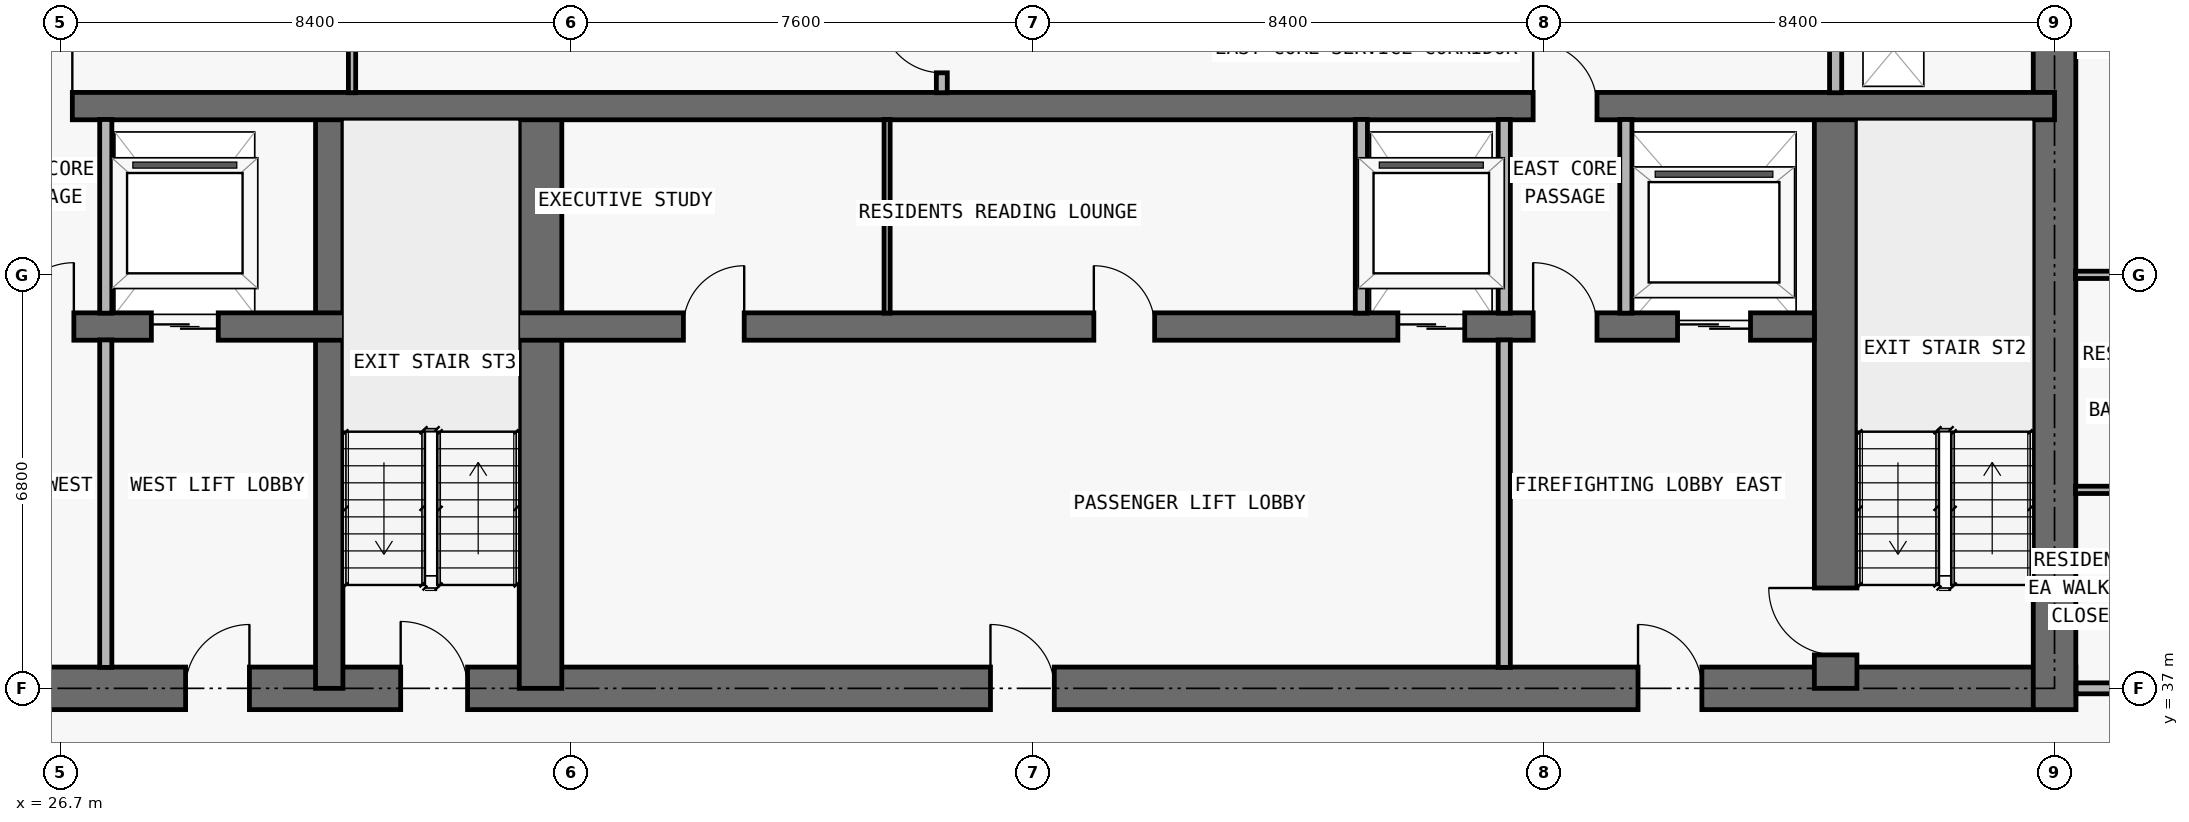
"""IFC4 building model, lengths in metres.
Left out: names, types, materials, properties, quantities, classifications, styles, units other than length and angle.
Written with IfcOpenShell. Run it as: python <this file> out.ifc"""

import sys

from ifc_helpers import new_model, si_unit, direction, frame, frame_2d, origin, place, context, subcontext, project, spatial, rectangle, extrude, element, fill, save


model = new_model("IFC4")
c1 = context("Model", 3, precision=1e-05, world=origin(), true_north=direction((0.0, 1.0)))
c2 = subcontext(c1, "Body", "Model", "MODEL_VIEW")
j1 = project(units=[si_unit("LENGTHUNIT", "METRE"), si_unit("PLANEANGLEUNIT", "RADIAN")], contexts=[c1])
p1 = place(None, origin())
s1 = spatial("IfcSite", under=j1, at=p1, CompositionType="ELEMENT")
p2 = place(p1, origin())
s2 = spatial("IfcBuilding", under=s1, at=p2, CompositionType="ELEMENT")
p3 = place(p2, frame((0.0, 0.0, 266.1)))
s3 = spatial("IfcBuildingStorey", under=s2, at=p3, CompositionType="ELEMENT", Elevation=266.1)
p4 = place(p3, frame((17.95, 37.0, 0.0), z_axis=(0.0, 0.0, 1.0), x_axis=(1.0, 0.0, 0.0)))
e1 = element("IfcWall", 1, at=p4, inside=s3, PredefinedType="SHEAR", context=c2, shape_type="SweptSolid", body=[
    extrude(rectangle(XDim=41.9, YDim=0.7, at=frame_2d((20.95, 0.0))), origin(), (0.0, 0.0, 1.0), 3.0),
])
p5 = place(p4, frame((14.35, 0.0, 0.0)))
e2 = element("IfcOpeningElement", 2, at=p5, cuts=e1, PredefinedType="OPENING", context=c2, shape_type="SweptSolid", body=[
    extrude(rectangle(XDim=1.1, YDim=2.15, at=frame_2d((0.55, 1.075))), frame((0.0, 0.36, 0.0), z_axis=(0.0, -1.0, 0.0), x_axis=(1.0, 0.0, 0.0)), (0.0, 0.0, 1.0), 0.72),
])
p6 = place(p4, frame((6.2, 0.0, 0.0)))
e3 = element("IfcOpeningElement", 3, at=p6, cuts=e1, PredefinedType="OPENING", context=c2, shape_type="SweptSolid", body=[
    extrude(rectangle(XDim=1.05, YDim=2.15, at=frame_2d((0.525, 1.075))), frame((0.0, 0.36, 0.0), z_axis=(0.0, -1.0, 0.0), x_axis=(1.0, 0.0, 0.0)), (0.0, 0.0, 1.0), 0.72),
])
p7 = place(p4, frame((34.7, 0.0, 0.0)))
e4 = element("IfcOpeningElement", 4, at=p7, cuts=e1, PredefinedType="OPENING", context=c2, shape_type="SweptSolid", body=[
    extrude(rectangle(XDim=1.05, YDim=2.15, at=frame_2d((0.525, 1.075))), frame((0.0, 0.36, 0.0), z_axis=(0.0, -1.0, 0.0), x_axis=(1.0, 0.0, 0.0)), (0.0, 0.0, 1.0), 0.72),
])
p8 = place(p4, frame((10.812, 0.0, 0.0)))
e5 = element("IfcOpeningElement", 5, at=p8, cuts=e1, PredefinedType="OPENING", context=c2, shape_type="SweptSolid", body=[
    extrude(rectangle(XDim=1.05, YDim=2.15, at=frame_2d((0.525, 1.075))), frame((0.0, 0.36, 0.0), z_axis=(0.0, -1.0, 0.0), x_axis=(1.0, 0.0, 0.0)), (0.0, 0.0, 1.0), 0.72),
])
p9 = place(p4, frame((24.05, 0.0, 0.0)))
e6 = element("IfcOpeningElement", 6, at=p9, cuts=e1, PredefinedType="OPENING", context=c2, shape_type="SweptSolid", body=[
    extrude(rectangle(XDim=1.05, YDim=2.15, at=frame_2d((0.525, 1.075))), frame((0.0, 0.36, 0.0), z_axis=(0.0, -1.0, 0.0), x_axis=(1.0, 0.0, 0.0)), (0.0, 0.0, 1.0), 0.72),
])
p10 = place(p3, frame((59.5, 36.65, 0.0), z_axis=(0.0, 0.0, 1.0), x_axis=(0.0, 1.0, 0.0)))
e7 = element("IfcWall", 7, at=p10, inside=s3, PredefinedType="SHEAR", context=c2, shape_type="SweptSolid", body=[
    extrude(rectangle(XDim=13.95, YDim=0.7, at=frame_2d((6.975, 0.0))), origin(), (0.0, 0.0, 1.0), 3.0),
])
p11 = place(p3, frame((55.9, 37.0, 0.0), z_axis=(0.0, 0.0, 1.0), x_axis=(0.0, 1.0, 0.0)))
e8 = element("IfcWall", 8, at=p11, inside=s3, PredefinedType="SHEAR", context=c2, shape_type="SweptSolid", body=[
    extrude(rectangle(XDim=9.575, YDim=0.7, at=frame_2d((4.788, 0.0))), origin(), (0.0, 0.0, 1.0), 3.0),
])
p12 = place(p11, frame((0.55, 0.0, 0.0)))
e9 = element("IfcOpeningElement", 9, at=p12, cuts=e8, PredefinedType="OPENING", context=c2, shape_type="SweptSolid", body=[
    extrude(rectangle(XDim=1.1, YDim=2.15, at=frame_2d((0.55, 1.075))), frame((0.0, 0.36, 0.0), z_axis=(0.0, -1.0, 0.0), x_axis=(1.0, 0.0, 0.0)), (0.0, 0.0, 1.0), 0.72),
])
p13 = place(p3, frame((31.125, 37.0, 0.0), z_axis=(0.0, 0.0, 1.0), x_axis=(0.0, 1.0, 0.0)))
e10 = element("IfcWall", 10, at=p13, inside=s3, PredefinedType="SHEAR", context=c2, shape_type="SweptSolid", body=[
    extrude(rectangle(XDim=9.575, YDim=0.45, at=frame_2d((4.788, 0.0))), origin(), (0.0, 0.0, 1.0), 3.0),
])
p14 = place(p3, frame((34.6, 37.0, 0.0), z_axis=(0.0, 0.0, 1.0), x_axis=(0.0, 1.0, 0.0)))
e11 = element("IfcWall", 11, at=p14, inside=s3, PredefinedType="SHEAR", context=c2, shape_type="SweptSolid", body=[
    extrude(rectangle(XDim=9.575, YDim=0.7, at=frame_2d((4.788, 0.0))), origin(), (0.0, 0.0, 1.0), 3.0),
])
p15 = place(p3, frame((22.25, 42.95, 0.0), z_axis=(0.0, 0.0, 1.0), x_axis=(1.0, 0.0, 0.0)))
e12 = element("IfcWall", 12, at=p15, inside=s3, PredefinedType="SHEAR", context=c2, shape_type="SweptSolid", body=[
    extrude(rectangle(XDim=33.3, YDim=0.45, at=frame_2d((16.65, 0.0))), origin(), (0.0, 0.0, 1.0), 3.0),
])
p16 = place(p15, frame((1.05, 0.0, 0.0)))
e13 = element("IfcOpeningElement", 13, at=p16, cuts=e12, PredefinedType="OPENING", context=c2, shape_type="SweptSolid", body=[
    extrude(rectangle(XDim=1.2, YDim=2.2, at=frame_2d((0.6, 1.1))), frame((0.0, 0.235, 0.0), z_axis=(0.0, -1.0, 0.0), x_axis=(1.0, 0.0, 0.0)), (0.0, 0.0, 1.0), 0.47),
])
p17 = place(p15, frame((31.05, 0.0, 0.0)))
e14 = element("IfcOpeningElement", 14, at=p17, cuts=e12, PredefinedType="OPENING", context=c2, shape_type="SweptSolid", body=[
    extrude(rectangle(XDim=1.2, YDim=2.2, at=frame_2d((0.6, 1.1))), frame((0.0, 0.235, 0.0), z_axis=(0.0, -1.0, 0.0), x_axis=(1.0, 0.0, 0.0)), (0.0, 0.0, 1.0), 0.47),
])
p18 = place(p15, frame((26.45, 0.0, 0.0)))
e15 = element("IfcOpeningElement", 15, at=p18, cuts=e12, PredefinedType="OPENING", context=c2, shape_type="SweptSolid", body=[
    extrude(rectangle(XDim=1.1, YDim=2.2, at=frame_2d((0.55, 1.1))), frame((0.0, 0.235, 0.0), z_axis=(0.0, -1.0, 0.0), x_axis=(1.0, 0.0, 0.0)), (0.0, 0.0, 1.0), 0.47),
])
p19 = place(p15, frame((5.95, 0.0, 0.0)))
e16 = element("IfcOpeningElement", 16, at=p19, cuts=e12, PredefinedType="OPENING", context=c2, shape_type="SweptSolid", body=[
    extrude(rectangle(XDim=1.1, YDim=2.2, at=frame_2d((0.55, 1.1))), frame((0.0, 0.235, 0.0), z_axis=(0.0, -1.0, 0.0), x_axis=(1.0, 0.0, 0.0)), (0.0, 0.0, 1.0), 0.47),
])
p20 = place(p15, frame((3.625, 0.0, 0.0)))
e17 = element("IfcOpeningElement", 17, at=p20, cuts=e12, PredefinedType="OPENING", context=c2, shape_type="SweptSolid", body=[
    extrude(rectangle(XDim=1.05, YDim=2.15, at=frame_2d((0.525, 1.075))), frame((0.0, 0.235, 0.0), z_axis=(0.0, -1.0, 0.0), x_axis=(1.0, 0.0, 0.0)), (0.0, 0.0, 1.0), 0.47),
])
p21 = place(p15, frame((28.675, 0.0, 0.0)))
e18 = element("IfcOpeningElement", 18, at=p21, cuts=e12, PredefinedType="OPENING", context=c2, shape_type="SweptSolid", body=[
    extrude(rectangle(XDim=1.05, YDim=2.15, at=frame_2d((0.525, 1.075))), frame((0.0, 0.235, 0.0), z_axis=(0.0, -1.0, 0.0), x_axis=(1.0, 0.0, 0.0)), (0.0, 0.0, 1.0), 0.47),
])
p22 = place(p15, frame((14.7, 0.0, 0.0)))
e19 = element("IfcOpeningElement", 19, at=p22, cuts=e12, PredefinedType="OPENING", context=c2, shape_type="SweptSolid", body=[
    extrude(rectangle(XDim=1.0, YDim=2.2, at=frame_2d((0.5, 1.1))), frame((0.0, 0.235, 0.0), z_axis=(0.0, -1.0, 0.0), x_axis=(1.0, 0.0, 0.0)), (0.0, 0.0, 1.0), 0.47),
])
p23 = place(p15, frame((21.45, 0.0, 0.0)))
e20 = element("IfcOpeningElement", 20, at=p23, cuts=e12, PredefinedType="OPENING", context=c2, shape_type="SweptSolid", body=[
    extrude(rectangle(XDim=1.0, YDim=2.2, at=frame_2d((0.5, 1.1))), frame((0.0, 0.235, 0.0), z_axis=(0.0, -1.0, 0.0), x_axis=(1.0, 0.0, 0.0)), (0.0, 0.0, 1.0), 0.47),
])
p24 = place(p3, frame((18.3, 46.575, 0.0), z_axis=(0.0, 0.0, 1.0), x_axis=(1.0, 0.0, 0.0)))
e21 = element("IfcWall", 21, at=p24, inside=s3, PredefinedType="SHEAR", context=c2, shape_type="SweptSolid", body=[
    extrude(rectangle(XDim=41.2, YDim=0.45, at=frame_2d((20.6, 0.0))), origin(), (0.0, 0.0, 1.0), 3.0),
])
p25 = place(p24, frame((7.6, 0.0, 0.0)))
e22 = element("IfcOpeningElement", 22, at=p25, cuts=e21, PredefinedType="OPENING", context=c2, shape_type="SweptSolid", body=[
    extrude(rectangle(XDim=1.0, YDim=2.2, at=frame_2d((0.5, 1.1))), frame((0.0, 0.235, 0.0), z_axis=(0.0, -1.0, 0.0), x_axis=(1.0, 0.0, 0.0)), (0.0, 0.0, 1.0), 0.47),
])
p26 = place(p24, frame((32.625, 0.0, 0.0)))
e23 = element("IfcOpeningElement", 23, at=p26, cuts=e21, PredefinedType="OPENING", context=c2, shape_type="SweptSolid", body=[
    extrude(rectangle(XDim=1.05, YDim=2.15, at=frame_2d((0.525, 1.075))), frame((0.0, 0.235, 0.0), z_axis=(0.0, -1.0, 0.0), x_axis=(1.0, 0.0, 0.0)), (0.0, 0.0, 1.0), 0.47),
])
p27 = place(p3, frame((27.45, 37.345, 0.0), z_axis=(0.0, 0.0, 1.0), x_axis=(0.0, 1.0, 0.0)))
e24 = element("IfcWall", 24, at=p27, inside=s3, PredefinedType="PARTITIONING", context=c2, shape_type="SweptSolid", body=[
    extrude(rectangle(XDim=5.385, YDim=0.2, at=frame_2d((2.692, 0.0))), origin(), (0.0, 0.0, 1.0), 3.0),
])
p28 = place(p3, frame((27.45, 43.17, 0.0), z_axis=(0.0, 0.0, 1.0), x_axis=(0.0, 1.0, 0.0)))
e25 = element("IfcWall", 25, at=p28, inside=s3, PredefinedType="PARTITIONING", context=c2, shape_type="SweptSolid", body=[
    extrude(rectangle(XDim=3.185, YDim=0.2, at=frame_2d((1.593, 0.0))), origin(), (0.0, 0.0, 1.0), 3.0),
])
p29 = place(p3, frame((31.5, 46.795, 0.0), z_axis=(0.0, 0.0, 1.0), x_axis=(0.0, 1.0, 0.0)))
e26 = element("IfcWall", 26, at=p29, inside=s3, PredefinedType="PARTITIONING", context=c2, shape_type="SweptSolid", body=[
    extrude(rectangle(XDim=3.16, YDim=0.12, at=frame_2d((1.58, 0.0))), origin(), (0.0, 0.0, 1.0), 3.0),
])
p30 = place(p3, frame((40.3, 43.17, 0.0), z_axis=(0.0, 0.0, 1.0), x_axis=(0.0, 1.0, 0.0)))
e27 = element("IfcWall", 27, at=p30, inside=s3, PredefinedType="MOVABLE", context=c2, shape_type="SweptSolid", body=[
    extrude(rectangle(XDim=3.185, YDim=0.1, at=frame_2d((1.593, 0.0))), origin(), (0.0, 0.0, 1.0), 3.0),
])
p31 = place(p3, frame((41.2, 46.795, 0.0), z_axis=(0.0, 0.0, 1.0), x_axis=(0.0, 1.0, 0.0)))
e28 = element("IfcWall", 28, at=p31, inside=s3, PredefinedType="PARTITIONING", context=c2, shape_type="SweptSolid", body=[
    extrude(rectangle(XDim=3.16, YDim=0.18, at=frame_2d((1.58, 0.0))), origin(), (0.0, 0.0, 1.0), 3.0),
])
p32 = place(p31, frame((0.327, 0.0, 0.0)))
e29 = element("IfcOpeningElement", 29, at=p32, cuts=e28, PredefinedType="OPENING", context=c2, shape_type="SweptSolid", body=[
    extrude(rectangle(XDim=1.0, YDim=2.2, at=frame_2d((0.5, 1.1))), frame((0.0, 0.1, 0.0), z_axis=(0.0, -1.0, 0.0), x_axis=(1.0, 0.0, 0.0)), (0.0, 0.0, 1.0), 0.2),
])
p33 = place(p3, frame((48.1, 43.17, 0.0), z_axis=(0.0, 0.0, 1.0), x_axis=(0.0, 1.0, 0.0)))
e30 = element("IfcWall", 30, at=p33, inside=s3, PredefinedType="PARTITIONING", context=c2, shape_type="SweptSolid", body=[
    extrude(rectangle(XDim=3.185, YDim=0.2, at=frame_2d((1.593, 0.0))), origin(), (0.0, 0.0, 1.0), 3.0),
])
p34 = place(p3, frame((50.45, 37.345, 0.0), z_axis=(0.0, 0.0, 1.0), x_axis=(0.0, 1.0, 0.0)))
e31 = element("IfcWall", 31, at=p34, inside=s3, PredefinedType="PARTITIONING", context=c2, shape_type="SweptSolid", body=[
    extrude(rectangle(XDim=5.385, YDim=0.2, at=frame_2d((2.692, 0.0))), origin(), (0.0, 0.0, 1.0), 3.0),
])
for number, where, z_axis, x_axis in (
    (32, (50.45, 43.17, 0.0), (0.0, 0.0, 1.0), (0.0, 1.0, 0.0)),
    (33, (52.45, 43.17, 0.0), (0.0, 0.0, 1.0), (0.0, 1.0, 0.0)),
):
    element("IfcWall", number, at=place(p3, frame(where, z_axis=z_axis, x_axis=x_axis)), inside=s3, PredefinedType="PARTITIONING", context=c2, shape_type="SweptSolid", body=[
        extrude(rectangle(XDim=3.185, YDim=0.2, at=frame_2d((1.593, 0.0))), origin(), (0.0, 0.0, 1.0), 3.0),
    ])
p35 = place(p3, frame((55.9, 46.795, 0.0), z_axis=(0.0, 0.0, 1.0), x_axis=(0.0, 1.0, 0.0)))
e34 = element("IfcWall", 34, at=p35, inside=s3, PredefinedType="PARTITIONING", context=c2, shape_type="SweptSolid", body=[
    extrude(rectangle(XDim=3.16, YDim=0.2, at=frame_2d((1.58, 0.0))), origin(), (0.0, 0.0, 1.0), 3.0),
])
p36 = place(p3, frame((59.855, 37.0, 0.0), z_axis=(0.0, 0.0, 1.0), x_axis=(1.0, 0.0, 0.0)))
e35 = element("IfcWall", 35, at=p36, inside=s3, PredefinedType="PARTITIONING", context=c2, shape_type="SweptSolid", body=[
    extrude(rectangle(XDim=5.845, YDim=0.18, at=frame_2d((2.922, 0.0))), origin(), (0.0, 0.0, 1.0), 3.0),
])
p37 = place(p36, frame((3.57, 0.0, 0.0)))
e36 = element("IfcOpeningElement", 36, at=p37, cuts=e35, PredefinedType="OPENING", context=c2, shape_type="SweptSolid", body=[
    extrude(rectangle(XDim=1.0, YDim=2.2, at=frame_2d((0.5, 1.1))), frame((0.0, 0.1, 0.0), z_axis=(0.0, -1.0, 0.0), x_axis=(1.0, 0.0, 0.0)), (0.0, 0.0, 1.0), 0.2),
])
p38 = place(p3, frame((59.845, 40.264, 0.0), z_axis=(0.0, 0.0, 1.0), x_axis=(1.0, 0.0, 0.0)))
e37 = element("IfcWall", 37, at=p38, inside=s3, PredefinedType="PARTITIONING", context=c2, shape_type="SweptSolid", body=[
    extrude(rectangle(XDim=2.305, YDim=0.12, at=frame_2d((1.152, 0.0))), origin(), (0.0, 0.0, 1.0), 3.0),
])
p39 = place(p3, frame((59.845, 43.8, 0.0), z_axis=(0.0, 0.0, 1.0), x_axis=(1.0, 0.0, 0.0)))
e38 = element("IfcWall", 38, at=p39, inside=s3, PredefinedType="PARTITIONING", context=c2, shape_type="SweptSolid", body=[
    extrude(rectangle(XDim=9.56, YDim=0.12, at=frame_2d((4.78, 0.0))), origin(), (0.0, 0.0, 1.0), 2.368),
])
p40 = place(p39, frame((3.63, 0.0, 0.0)))
e39 = element("IfcOpeningElement", 39, at=p40, cuts=e38, PredefinedType="OPENING", context=c2, shape_type="SweptSolid", body=[
    extrude(rectangle(XDim=0.9, YDim=2.15, at=frame_2d((0.45, 1.075))), frame((0.0, 0.07, 0.0), z_axis=(0.0, -1.0, 0.0), x_axis=(1.0, 0.0, 0.0)), (0.0, 0.0, 1.0), 0.14),
])
p41 = place(p39, frame((0.728, 0.0, 0.0)))
e40 = element("IfcOpeningElement", 40, at=p41, cuts=e38, PredefinedType="OPENING", context=c2, shape_type="SweptSolid", body=[
    extrude(rectangle(XDim=0.85, YDim=2.1, at=frame_2d((0.425, 1.05))), frame((0.0, 0.07, 0.0), z_axis=(0.0, -1.0, 0.0), x_axis=(1.0, 0.0, 0.0)), (0.0, 0.0, 1.0), 0.14),
])
p42 = place(p17, origin())
e41 = element("IfcDoor", 41, at=p42, inside=s3, OperationType="DOUBLE_DOOR_SLIDING", PredefinedType="DOOR", context=c2, shape_type="SweptSolid", body=[
    extrude(rectangle(XDim=1.2, YDim=2.2, at=frame_2d((0.6, 1.1))), frame((0.0, 0.025, 0.0), z_axis=(0.0, -1.0, 0.0), x_axis=(1.0, 0.0, 0.0)), (0.0, 0.0, 1.0), 0.05),
])
fill(e14, e41)
p43 = place(p18, origin())
e42 = element("IfcDoor", 42, at=p43, inside=s3, OperationType="DOUBLE_DOOR_SLIDING", PredefinedType="DOOR", context=c2, shape_type="SweptSolid", body=[
    extrude(rectangle(XDim=1.1, YDim=2.2, at=frame_2d((0.55, 1.1))), frame((0.0, 0.025, 0.0), z_axis=(0.0, -1.0, 0.0), x_axis=(1.0, 0.0, 0.0)), (0.0, 0.0, 1.0), 0.05),
])
fill(e15, e42)
p44 = place(p19, origin())
e43 = element("IfcDoor", 43, at=p44, inside=s3, OperationType="DOUBLE_DOOR_SLIDING", PredefinedType="DOOR", context=c2, shape_type="SweptSolid", body=[
    extrude(rectangle(XDim=1.1, YDim=2.2, at=frame_2d((0.55, 1.1))), frame((0.0, 0.025, 0.0), z_axis=(0.0, -1.0, 0.0), x_axis=(1.0, 0.0, 0.0)), (0.0, 0.0, 1.0), 0.05),
])
fill(e16, e43)
p45 = place(p5, origin())
e44 = element("IfcDoor", 44, at=p45, inside=s3, OperationType="SINGLE_SWING_LEFT", PredefinedType="DOOR", context=c2, shape_type="SweptSolid", body=[
    extrude(rectangle(XDim=1.1, YDim=2.15, at=frame_2d((0.55, 1.075))), frame((0.0, 0.025, 0.0), z_axis=(0.0, -1.0, 0.0), x_axis=(1.0, 0.0, 0.0)), (0.0, 0.0, 1.0), 0.05),
])
fill(e2, e44)
p46 = place(p20, origin())
e45 = element("IfcDoor", 45, at=p46, inside=s3, OperationType="SINGLE_SWING_RIGHT", PredefinedType="DOOR", context=c2, shape_type="SweptSolid", body=[
    extrude(rectangle(XDim=1.05, YDim=2.15, at=frame_2d((0.525, 1.075))), frame((0.0, 0.025, 0.0), z_axis=(0.0, -1.0, 0.0), x_axis=(1.0, 0.0, 0.0)), (0.0, 0.0, 1.0), 0.05),
])
fill(e17, e45)
p47 = place(p7, origin())
e46 = element("IfcDoor", 46, at=p47, inside=s3, OperationType="SINGLE_SWING_LEFT", PredefinedType="DOOR", context=c2, shape_type="SweptSolid", body=[
    extrude(rectangle(XDim=1.05, YDim=2.15, at=frame_2d((0.525, 1.075))), frame((0.0, 0.025, 0.0), z_axis=(0.0, -1.0, 0.0), x_axis=(1.0, 0.0, 0.0)), (0.0, 0.0, 1.0), 0.05),
])
fill(e4, e46)
p48 = place(p12, origin())
e47 = element("IfcDoor", 47, at=p48, inside=s3, OperationType="SINGLE_SWING_RIGHT", PredefinedType="DOOR", context=c2, shape_type="SweptSolid", body=[
    extrude(rectangle(XDim=1.1, YDim=2.15, at=frame_2d((0.55, 1.075))), frame((0.0, 0.025, 0.0), z_axis=(0.0, -1.0, 0.0), x_axis=(1.0, 0.0, 0.0)), (0.0, 0.0, 1.0), 0.05),
])
fill(e9, e47)
p49 = place(p21, origin())
e48 = element("IfcDoor", 48, at=p49, inside=s3, OperationType="SINGLE_SWING_LEFT", PredefinedType="DOOR", context=c2, shape_type="SweptSolid", body=[
    extrude(rectangle(XDim=1.05, YDim=2.15, at=frame_2d((0.525, 1.075))), frame((0.0, 0.025, 0.0), z_axis=(0.0, -1.0, 0.0), x_axis=(1.0, 0.0, 0.0)), (0.0, 0.0, 1.0), 0.05),
])
fill(e18, e48)
p50 = place(p8, origin())
e49 = element("IfcDoor", 49, at=p50, inside=s3, OperationType="SINGLE_SWING_RIGHT", PredefinedType="DOOR", context=c2, shape_type="SweptSolid", body=[
    extrude(rectangle(XDim=1.05, YDim=2.15, at=frame_2d((0.525, 1.075))), frame((0.0, 0.025, 0.0), z_axis=(0.0, -1.0, 0.0), x_axis=(1.0, 0.0, 0.0)), (0.0, 0.0, 1.0), 0.05),
])
fill(e5, e49)
p51 = place(p9, origin())
e50 = element("IfcDoor", 50, at=p51, inside=s3, OperationType="SINGLE_SWING_LEFT", PredefinedType="DOOR", context=c2, shape_type="SweptSolid", body=[
    extrude(rectangle(XDim=1.05, YDim=2.15, at=frame_2d((0.525, 1.075))), frame((0.0, 0.025, 0.0), z_axis=(0.0, -1.0, 0.0), x_axis=(1.0, 0.0, 0.0)), (0.0, 0.0, 1.0), 0.05),
])
fill(e6, e50)
p52 = place(p22, origin())
e51 = element("IfcDoor", 51, at=p52, inside=s3, OperationType="SINGLE_SWING_RIGHT", PredefinedType="DOOR", context=c2, shape_type="SweptSolid", body=[
    extrude(rectangle(XDim=1.0, YDim=2.2, at=frame_2d((0.5, 1.1))), frame((0.0, 0.025, 0.0), z_axis=(0.0, -1.0, 0.0), x_axis=(1.0, 0.0, 0.0)), (0.0, 0.0, 1.0), 0.05),
])
fill(e19, e51)
p53 = place(p23, origin())
e52 = element("IfcDoor", 52, at=p53, inside=s3, OperationType="SINGLE_SWING_LEFT", PredefinedType="DOOR", context=c2, shape_type="SweptSolid", body=[
    extrude(rectangle(XDim=1.0, YDim=2.2, at=frame_2d((0.5, 1.1))), frame((0.0, 0.025, 0.0), z_axis=(0.0, -1.0, 0.0), x_axis=(1.0, 0.0, 0.0)), (0.0, 0.0, 1.0), 0.05),
])
fill(e20, e52)
p54 = place(p25, origin())
e53 = element("IfcDoor", 53, at=p54, inside=s3, OperationType="SINGLE_SWING_RIGHT", PredefinedType="DOOR", context=c2, shape_type="SweptSolid", body=[
    extrude(rectangle(XDim=1.0, YDim=2.2, at=frame_2d((0.5, 1.1))), frame((0.0, 0.025, 0.0), z_axis=(0.0, -1.0, 0.0), x_axis=(1.0, 0.0, 0.0)), (0.0, 0.0, 1.0), 0.05),
])
fill(e22, e53)
p55 = place(p26, origin())
e54 = element("IfcDoor", 54, at=p55, inside=s3, OperationType="SINGLE_SWING_LEFT", PredefinedType="DOOR", context=c2, shape_type="SweptSolid", body=[
    extrude(rectangle(XDim=1.05, YDim=2.15, at=frame_2d((0.525, 1.075))), frame((0.0, 0.025, 0.0), z_axis=(0.0, -1.0, 0.0), x_axis=(1.0, 0.0, 0.0)), (0.0, 0.0, 1.0), 0.05),
])
fill(e23, e54)
p56 = place(p32, origin())
e55 = element("IfcDoor", 55, at=p56, inside=s3, OperationType="SINGLE_SWING_RIGHT", PredefinedType="DOOR", context=c2, shape_type="SweptSolid", body=[
    extrude(rectangle(XDim=1.0, YDim=2.2, at=frame_2d((0.5, 1.1))), frame((0.0, 0.025, 0.0), z_axis=(0.0, -1.0, 0.0), x_axis=(1.0, 0.0, 0.0)), (0.0, 0.0, 1.0), 0.05),
])
fill(e29, e55)
save(model, sys.argv[1])
